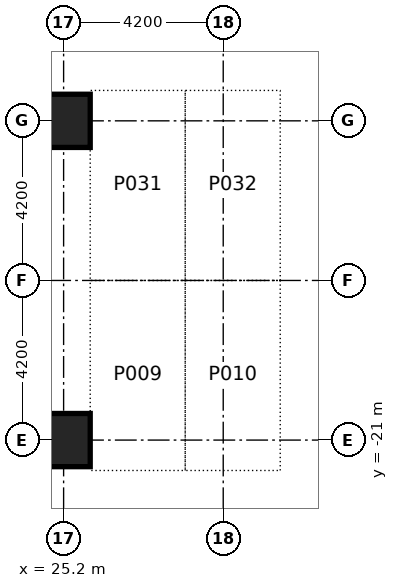
"""IFC4 building model, lengths in metres.
Left out: names, types, materials, properties, quantities, classifications, styles, units other than length and angle.
Written with IfcOpenShell. Run it as: python <this file> out.ifc"""

import sys

from ifc_helpers import new_model, si_unit, direction, frame, origin, origin_2d, place, context, subcontext, project, spatial, rectangle, extrude, element, save


model = new_model("IFC4")
c1 = context("Model", 3, precision=1e-05, world=origin(), true_north=direction((0.0, 1.0)))
c2 = subcontext(c1, "Body", "Model", "MODEL_VIEW")
j1 = project(units=[si_unit("LENGTHUNIT", "METRE"), si_unit("PLANEANGLEUNIT", "RADIAN")], contexts=[c1])
p1 = place(None, origin())
s1 = spatial("IfcSite", under=j1, at=p1, CompositionType="ELEMENT")
p2 = place(p1, origin())
s2 = spatial("IfcBuilding", under=s1, at=p2, CompositionType="ELEMENT")
p3 = place(p2, frame((0.0, 0.0, -4.2)))
s3 = spatial("IfcBuildingStorey", under=s2, at=p3, CompositionType="ELEMENT", Elevation=-4.2)
p4 = place(p3, frame((25.2, -12.6, -0.35), z_axis=(0.0, 0.0, 1.0), x_axis=(1.0, 0.0, 0.0)))
e1 = element("IfcColumn", 1, at=p4, inside=s3, PredefinedType="COLUMN", context=c2, shape_type="SweptSolid", body=[
    extrude(rectangle(XDim=1.4, YDim=1.4, at=origin_2d()), origin(), (0.0, 0.0, 1.0), 4.1),
])
p5 = place(p3, frame((25.2, -21.0, 0.0), z_axis=(0.0, 0.0, 1.0), x_axis=(1.0, 0.0, 0.0)))
e2 = element("IfcColumn", 2, at=p5, inside=s3, PredefinedType="COLUMN", context=c2, shape_type="SweptSolid", body=[
    extrude(rectangle(XDim=1.4, YDim=1.4, at=origin_2d()), origin(), (0.0, 0.0, 1.0), 4.2),
])
save(model, sys.argv[1])
